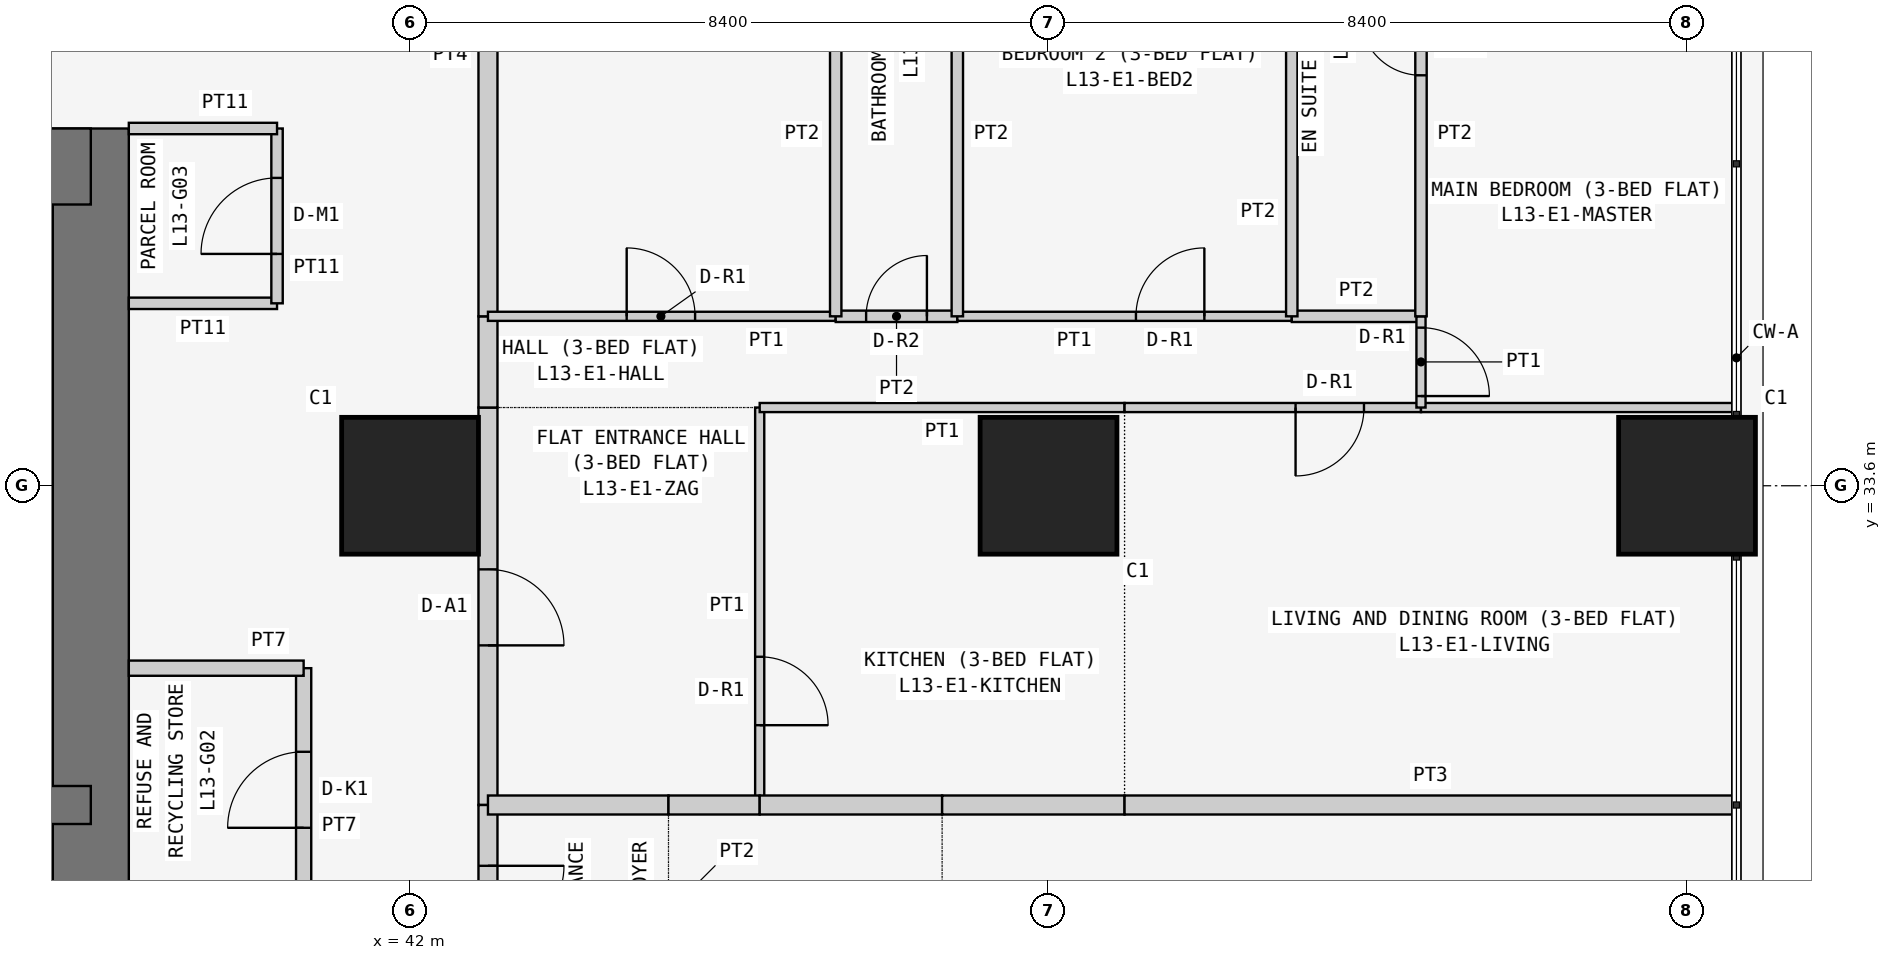
"""IFC4 building model, lengths in metres.
Left out: names, types, materials, properties, quantities, classifications, styles, units other than length and angle.
Written with IfcOpenShell. Run it as: python <this file> out.ifc"""

import sys

from ifc_helpers import new_model, si_unit, direction, frame, frame_2d, origin, origin_2d, place, context, subcontext, project, spatial, rectangle, extrude, element, fill, save


model = new_model("IFC4")
c1 = context("Model", 3, precision=1e-05, world=origin(), true_north=direction((0.0, 1.0)))
c2 = subcontext(c1, "Body", "Model", "MODEL_VIEW")
j1 = project(units=[si_unit("LENGTHUNIT", "METRE"), si_unit("PLANEANGLEUNIT", "RADIAN")], contexts=[c1])
p1 = place(None, origin())
s1 = spatial("IfcSite", under=j1, at=p1, CompositionType="ELEMENT")
p2 = place(p1, origin())
s2 = spatial("IfcBuilding", under=s1, at=p2, CompositionType="ELEMENT")
p3 = place(p2, frame((0.0, 0.0, 56.1)))
s3 = spatial("IfcBuildingStorey", under=s2, at=p3, CompositionType="ELEMENT", Elevation=56.1)
for number, where, z_axis, x_axis in (
    (1, (42.0, 33.6, 0.0), (0.0, 0.0, 1.0), (1.0, 0.0, 0.0)),
    (2, (50.4, 33.6, 0.0), (0.0, 0.0, 1.0), (1.0, 0.0, 0.0)),
    (3, (58.8, 33.6, 0.0), (0.0, 0.0, 1.0), (1.0, 0.0, 0.0)),
):
    element("IfcColumn", number, at=place(p3, frame(where, z_axis=z_axis, x_axis=x_axis)), inside=s3, PredefinedType="COLUMN", context=c2, shape_type="SweptSolid", body=[
        extrude(rectangle(XDim=1.8, YDim=1.8, at=origin_2d()), origin(), (0.0, 0.0, 1.0), 3.6),
    ])
p4 = place(p3, frame((37.8, 21.0, 0.0), z_axis=(0.0, 0.0, 1.0), x_axis=(0.0, 1.0, 0.0)))
e4 = element("IfcWall", 4, at=p4, inside=s3, PredefinedType="SHEAR", context=c2, shape_type="SweptSolid", body=[
    extrude(rectangle(XDim=17.3, YDim=1.0, at=frame_2d((8.65, 0.0))), origin(), (0.0, 0.0, 1.0), 3.6),
])
p5 = place(p4, frame((5.2, 0.0, 0.0)))
e5 = element("IfcOpeningElement", 5, at=p5, cuts=e4, PredefinedType="OPENING", context=c2, shape_type="SweptSolid", body=[
    extrude(rectangle(XDim=1.2, YDim=2.1, at=frame_2d((0.6, 1.05))), frame((0.0, 0.51, 0.0), z_axis=(0.0, -1.0, 0.0), x_axis=(1.0, 0.0, 0.0)), (0.0, 0.0, 1.0), 1.02),
])
p6 = place(p3, frame((37.8, 37.8, 0.0), z_axis=(0.0, 0.0, 1.0), x_axis=(-1.0, 0.0, 0.0)))
e6 = element("IfcWall", 6, at=p6, inside=s3, PredefinedType="SHEAR", context=c2, shape_type="SweptSolid", body=[
    extrude(rectangle(XDim=17.3, YDim=1.0, at=frame_2d((8.65, 0.0))), origin(), (0.0, 0.0, 1.0), 3.6),
])
p7 = place(p3, frame((32.2, 29.4, 0.0), z_axis=(0.0, 0.0, 1.0), x_axis=(1.0, 0.0, 0.0)))
e7 = element("IfcWall", 7, at=p7, inside=s3, PredefinedType="SHEAR", context=c2, shape_type="SweptSolid", body=[
    extrude(rectangle(XDim=5.6, YDim=0.5, at=frame_2d((2.8, 0.0))), origin(), (0.0, 0.0, 1.0), 3.6),
])
p8 = place(p7, frame((2.0, 0.0, 0.0)))
e8 = element("IfcOpeningElement", 8, at=p8, cuts=e7, PredefinedType="OPENING", context=c2, shape_type="SweptSolid", body=[
    extrude(rectangle(XDim=1.2, YDim=2.1, at=frame_2d((0.6, 1.05))), frame((0.0, 0.26, 0.0), z_axis=(0.0, -1.0, 0.0), x_axis=(1.0, 0.0, 0.0)), (0.0, 0.0, 1.0), 0.52),
])
p9 = place(p3, frame((40.6, 28.0, 0.0), z_axis=(0.0, 0.0, 1.0), x_axis=(0.0, 1.0, 0.0)))
e9 = element("IfcWall", 9, at=p9, inside=s3, PredefinedType="PARTITIONING", context=c2, shape_type="SweptSolid", body=[
    extrude(rectangle(XDim=3.2, YDim=0.2, at=frame_2d((1.6, 0.0))), origin(), (0.0, 0.0, 1.0), 3.45),
])
p10 = place(p9, frame((1.1, 0.0, 0.0)))
e10 = element("IfcOpeningElement", 10, at=p10, cuts=e9, PredefinedType="OPENING", context=c2, shape_type="SweptSolid", body=[
    extrude(rectangle(XDim=1.0, YDim=2.1, at=frame_2d((0.5, 1.05))), frame((0.0, 0.11, 0.0), z_axis=(0.0, -1.0, 0.0), x_axis=(1.0, 0.0, 0.0)), (0.0, 0.0, 1.0), 0.22),
])
p11 = place(p3, frame((40.6, 31.2, 0.0), z_axis=(0.0, 0.0, 1.0), x_axis=(-1.0, 0.0, 0.0)))
e11 = element("IfcWall", 11, at=p11, inside=s3, PredefinedType="PARTITIONING", context=c2, shape_type="SweptSolid", body=[
    extrude(rectangle(XDim=2.3, YDim=0.2, at=frame_2d((1.15, 0.0))), origin(), (0.0, 0.0, 1.0), 3.45),
])
p12 = place(p3, frame((38.3, 36.0, 0.0), z_axis=(0.0, 0.0, 1.0), x_axis=(1.0, 0.0, 0.0)))
e12 = element("IfcWall", 12, at=p12, inside=s3, PredefinedType="PARTITIONING", context=c2, shape_type="SweptSolid", body=[
    extrude(rectangle(XDim=1.95, YDim=0.15, at=frame_2d((0.975, 0.0))), origin(), (0.0, 0.0, 1.0), 3.45),
])
p13 = place(p3, frame((40.25, 36.0, 0.0), z_axis=(0.0, 0.0, 1.0), x_axis=(0.0, 1.0, 0.0)))
e13 = element("IfcWall", 13, at=p13, inside=s3, PredefinedType="PARTITIONING", context=c2, shape_type="SweptSolid", body=[
    extrude(rectangle(XDim=2.3, YDim=0.15, at=frame_2d((1.15, 0.0))), origin(), (0.0, 0.0, 1.0), 3.45),
])
p14 = place(p13, frame((0.65, 0.0, 0.0)))
e14 = element("IfcOpeningElement", 14, at=p14, cuts=e13, PredefinedType="OPENING", context=c2, shape_type="SweptSolid", body=[
    extrude(rectangle(XDim=1.0, YDim=2.1, at=frame_2d((0.5, 1.05))), frame((0.0, 0.085, 0.0), z_axis=(0.0, -1.0, 0.0), x_axis=(1.0, 0.0, 0.0)), (0.0, 0.0, 1.0), 0.17),
])
p15 = place(p3, frame((40.25, 38.3, 0.0), z_axis=(0.0, 0.0, 1.0), x_axis=(-1.0, 0.0, 0.0)))
e15 = element("IfcWall", 15, at=p15, inside=s3, PredefinedType="PARTITIONING", context=c2, shape_type="SweptSolid", body=[
    extrude(rectangle(XDim=1.95, YDim=0.15, at=frame_2d((0.975, 0.0))), origin(), (0.0, 0.0, 1.0), 3.45),
])
p16 = place(p3, frame((43.025, 34.629, 0.0), z_axis=(0.0, 0.0, 1.0), x_axis=(0.0, -1.0, 0.0)))
e16 = element("IfcWall", 16, at=p16, inside=s3, PredefinedType="PARTITIONING", context=c2, shape_type="SweptSolid", body=[
    extrude(rectangle(XDim=5.229, YDim=0.25, at=frame_2d((2.615, 0.0))), origin(), (0.0, 0.0, 1.0), 3.45),
])
p17 = place(p16, frame((2.129, 0.0, 0.0)))
e17 = element("IfcOpeningElement", 17, at=p17, cuts=e16, PredefinedType="OPENING", context=c2, shape_type="SweptSolid", body=[
    extrude(rectangle(XDim=1.0, YDim=2.1, at=frame_2d((0.5, 1.05))), frame((0.0, 0.135, 0.0), z_axis=(0.0, -1.0, 0.0), x_axis=(1.0, 0.0, 0.0)), (0.0, 0.0, 1.0), 0.27),
])
p18 = place(p3, frame((43.025, 35.829, 0.0), z_axis=(0.0, 0.0, 1.0), x_axis=(0.0, -1.0, 0.0)))
e18 = element("IfcWall", 18, at=p18, inside=s3, PredefinedType="PARTITIONING", context=c2, shape_type="SweptSolid", body=[
    extrude(rectangle(XDim=1.2, YDim=0.25, at=frame_2d((0.6, 0.0))), origin(), (0.0, 0.0, 1.0), 3.45),
])
p19 = place(p3, frame((43.025, 42.7, 0.0), z_axis=(0.0, 0.0, 1.0), x_axis=(0.0, -1.0, 0.0)))
e19 = element("IfcWall", 19, at=p19, inside=s3, PredefinedType="PARTITIONING", context=c2, shape_type="SweptSolid", body=[
    extrude(rectangle(XDim=6.871, YDim=0.25, at=frame_2d((3.436, 0.0))), origin(), (0.0, 0.0, 1.0), 3.45),
])
p20 = place(p3, frame((43.025, 29.4, 0.0), z_axis=(0.0, 0.0, 1.0), x_axis=(0.0, -1.0, 0.0)))
e20 = element("IfcWall", 20, at=p20, inside=s3, PredefinedType="PARTITIONING", context=c2, shape_type="SweptSolid", body=[
    extrude(rectangle(XDim=2.6, YDim=0.25, at=frame_2d((1.3, 0.0))), origin(), (0.0, 0.0, 1.0), 3.45),
])
p21 = place(p20, frame((0.8, 0.0, 0.0)))
e21 = element("IfcOpeningElement", 21, at=p21, cuts=e20, PredefinedType="OPENING", context=c2, shape_type="SweptSolid", body=[
    extrude(rectangle(XDim=1.0, YDim=2.1, at=frame_2d((0.5, 1.05))), frame((0.0, 0.135, 0.0), z_axis=(0.0, -1.0, 0.0), x_axis=(1.0, 0.0, 0.0)), (0.0, 0.0, 1.0), 0.27),
])
p22 = place(p3, frame((46.6, 29.4, 0.0), z_axis=(0.0, 0.0, 1.0), x_axis=(0.0, 1.0, 0.0)))
e22 = element("IfcWall", 22, at=p22, inside=s3, PredefinedType="PARTITIONING", context=c2, shape_type="SweptSolid", body=[
    extrude(rectangle(XDim=5.229, YDim=0.12, at=frame_2d((2.615, 0.0))), origin(), (0.0, 0.0, 1.0), 3.45),
])
p23 = place(p22, frame((1.05, 0.0, 0.0)))
e23 = element("IfcOpeningElement", 23, at=p23, cuts=e22, PredefinedType="OPENING", context=c2, shape_type="SweptSolid", body=[
    extrude(rectangle(XDim=0.9, YDim=2.1, at=frame_2d((0.45, 1.05))), frame((0.0, 0.07, 0.0), z_axis=(0.0, -1.0, 0.0), x_axis=(1.0, 0.0, 0.0)), (0.0, 0.0, 1.0), 0.14),
])
p24 = place(p3, frame((43.025, 29.4, 0.0), z_axis=(0.0, 0.0, 1.0), x_axis=(1.0, 0.0, 0.0)))
e24 = element("IfcWall", 24, at=p24, inside=s3, PredefinedType="PARTITIONING", context=c2, shape_type="SweptSolid", body=[
    extrude(rectangle(XDim=2.375, YDim=0.25, at=frame_2d((1.188, 0.0))), origin(), (0.0, 0.0, 1.0), 3.45),
])
p25 = place(p3, frame((45.4, 29.4, 0.0), z_axis=(0.0, 0.0, 1.0), x_axis=(1.0, 0.0, 0.0)))
e25 = element("IfcWall", 25, at=p25, inside=s3, PredefinedType="PARTITIONING", context=c2, shape_type="SweptSolid", body=[
    extrude(rectangle(XDim=1.2, YDim=0.25, at=frame_2d((0.6, 0.0))), origin(), (0.0, 0.0, 1.0), 3.45),
])
p26 = place(p3, frame((51.4, 34.629, 0.0), z_axis=(0.0, 0.0, 1.0), x_axis=(-1.0, 0.0, 0.0)))
e26 = element("IfcWall", 26, at=p26, inside=s3, PredefinedType="PARTITIONING", context=c2, shape_type="SweptSolid", body=[
    extrude(rectangle(XDim=4.8, YDim=0.12, at=frame_2d((2.4, 0.0))), origin(), (0.0, 0.0, 1.0), 3.45),
])
for number, where, z_axis, x_axis in (
    (27, (46.6, 29.4, 0.0), (0.0, 0.0, 1.0), (1.0, 0.0, 0.0)),
    (28, (49.0, 29.4, 0.0), (0.0, 0.0, 1.0), (1.0, 0.0, 0.0)),
):
    element("IfcWall", number, at=place(p3, frame(where, z_axis=z_axis, x_axis=x_axis)), inside=s3, PredefinedType="PARTITIONING", context=c2, shape_type="SweptSolid", body=[
        extrude(rectangle(XDim=2.4, YDim=0.25, at=frame_2d((1.2, 0.0))), origin(), (0.0, 0.0, 1.0), 3.45),
    ])
p27 = place(p3, frame((55.3, 34.629, 0.0), z_axis=(0.0, 0.0, 1.0), x_axis=(-1.0, 0.0, 0.0)))
e29 = element("IfcWall", 29, at=p27, inside=s3, PredefinedType="PARTITIONING", context=c2, shape_type="SweptSolid", body=[
    extrude(rectangle(XDim=3.9, YDim=0.12, at=frame_2d((1.95, 0.0))), origin(), (0.0, 0.0, 1.0), 3.45),
])
p28 = place(p27, frame((0.75, 0.0, 0.0)))
e30 = element("IfcOpeningElement", 30, at=p28, cuts=e29, PredefinedType="OPENING", context=c2, shape_type="SweptSolid", body=[
    extrude(rectangle(XDim=0.9, YDim=2.1, at=frame_2d((0.45, 1.05))), frame((0.0, 0.07, 0.0), z_axis=(0.0, -1.0, 0.0), x_axis=(1.0, 0.0, 0.0)), (0.0, 0.0, 1.0), 0.14),
])
p29 = place(p3, frame((59.45, 34.629, 0.0), z_axis=(0.0, 0.0, 1.0), x_axis=(-1.0, 0.0, 0.0)))
e31 = element("IfcWall", 31, at=p29, inside=s3, PredefinedType="PARTITIONING", context=c2, shape_type="SweptSolid", body=[
    extrude(rectangle(XDim=4.15, YDim=0.12, at=frame_2d((2.075, 0.0))), origin(), (0.0, 0.0, 1.0), 3.45),
])
p30 = place(p3, frame((51.4, 29.4, 0.0), z_axis=(0.0, 0.0, 1.0), x_axis=(1.0, 0.0, 0.0)))
e32 = element("IfcWall", 32, at=p30, inside=s3, PredefinedType="PARTITIONING", context=c2, shape_type="SweptSolid", body=[
    extrude(rectangle(XDim=8.05, YDim=0.25, at=frame_2d((4.025, 0.0))), origin(), (0.0, 0.0, 1.0), 3.45),
])
p31 = place(p3, frame((47.6, 35.829, 0.0), z_axis=(0.0, 0.0, 1.0), x_axis=(-1.0, 0.0, 0.0)))
e33 = element("IfcWall", 33, at=p31, inside=s3, PredefinedType="PARTITIONING", context=c2, shape_type="SweptSolid", body=[
    extrude(rectangle(XDim=4.575, YDim=0.12, at=frame_2d((2.288, 0.0))), origin(), (0.0, 0.0, 1.0), 3.45),
])
p32 = place(p31, frame((1.85, 0.0, 0.0)))
e34 = element("IfcOpeningElement", 34, at=p32, cuts=e33, PredefinedType="OPENING", context=c2, shape_type="SweptSolid", body=[
    extrude(rectangle(XDim=0.9, YDim=2.1, at=frame_2d((0.45, 1.05))), frame((0.0, 0.07, 0.0), z_axis=(0.0, -1.0, 0.0), x_axis=(1.0, 0.0, 0.0)), (0.0, 0.0, 1.0), 0.14),
])
p33 = place(p3, frame((49.2, 35.829, 0.0), z_axis=(0.0, 0.0, 1.0), x_axis=(-1.0, 0.0, 0.0)))
e35 = element("IfcWall", 35, at=p33, inside=s3, PredefinedType="PARTITIONING", context=c2, shape_type="SweptSolid", body=[
    extrude(rectangle(XDim=1.6, YDim=0.15, at=frame_2d((0.8, 0.0))), origin(), (0.0, 0.0, 1.0), 3.45),
])
p34 = place(p33, frame((0.4, 0.0, 0.0)))
e36 = element("IfcOpeningElement", 36, at=p34, cuts=e35, PredefinedType="OPENING", context=c2, shape_type="SweptSolid", body=[
    extrude(rectangle(XDim=0.8, YDim=2.1, at=frame_2d((0.4, 1.05))), frame((0.0, 0.085, 0.0), z_axis=(0.0, -1.0, 0.0), x_axis=(1.0, 0.0, 0.0)), (0.0, 0.0, 1.0), 0.17),
])
p35 = place(p3, frame((53.6, 35.829, 0.0), z_axis=(0.0, 0.0, 1.0), x_axis=(-1.0, 0.0, 0.0)))
e37 = element("IfcWall", 37, at=p35, inside=s3, PredefinedType="PARTITIONING", context=c2, shape_type="SweptSolid", body=[
    extrude(rectangle(XDim=4.4, YDim=0.12, at=frame_2d((2.2, 0.0))), origin(), (0.0, 0.0, 1.0), 3.45),
])
p36 = place(p35, frame((1.15, 0.0, 0.0)))
e38 = element("IfcOpeningElement", 38, at=p36, cuts=e37, PredefinedType="OPENING", context=c2, shape_type="SweptSolid", body=[
    extrude(rectangle(XDim=0.9, YDim=2.1, at=frame_2d((0.45, 1.05))), frame((0.0, 0.07, 0.0), z_axis=(0.0, -1.0, 0.0), x_axis=(1.0, 0.0, 0.0)), (0.0, 0.0, 1.0), 0.14),
])
p37 = place(p3, frame((55.3, 35.829, 0.0), z_axis=(0.0, 0.0, 1.0), x_axis=(-1.0, 0.0, 0.0)))
e39 = element("IfcWall", 39, at=p37, inside=s3, PredefinedType="PARTITIONING", context=c2, shape_type="SweptSolid", body=[
    extrude(rectangle(XDim=1.7, YDim=0.15, at=frame_2d((0.85, 0.0))), origin(), (0.0, 0.0, 1.0), 3.45),
])
p38 = place(p3, frame((55.3, 34.629, 0.0), z_axis=(0.0, 0.0, 1.0), x_axis=(0.0, 1.0, 0.0)))
e40 = element("IfcWall", 40, at=p38, inside=s3, PredefinedType="PARTITIONING", context=c2, shape_type="SweptSolid", body=[
    extrude(rectangle(XDim=1.2, YDim=0.12, at=frame_2d((0.6, 0.0))), origin(), (0.0, 0.0, 1.0), 3.45),
])
p39 = place(p38, frame((0.151, 0.0, 0.0)))
e41 = element("IfcOpeningElement", 41, at=p39, cuts=e40, PredefinedType="OPENING", context=c2, shape_type="SweptSolid", body=[
    extrude(rectangle(XDim=0.9, YDim=2.1, at=frame_2d((0.45, 1.05))), frame((0.0, 0.07, 0.0), z_axis=(0.0, -1.0, 0.0), x_axis=(1.0, 0.0, 0.0)), (0.0, 0.0, 1.0), 0.14),
])
for number, where, z_axis, x_axis in (
    (42, (47.6, 35.829, 0.0), (0.0, 0.0, 1.0), (0.0, 1.0, 0.0)),
    (43, (49.2, 35.829, 0.0), (0.0, 0.0, 1.0), (0.0, 1.0, 0.0)),
    (44, (53.6, 35.829, 0.0), (0.0, 0.0, 1.0), (0.0, 1.0, 0.0)),
):
    element("IfcWall", number, at=place(p3, frame(where, z_axis=z_axis, x_axis=x_axis)), inside=s3, PredefinedType="PARTITIONING", context=c2, shape_type="SweptSolid", body=[
        extrude(rectangle(XDim=6.871, YDim=0.15, at=frame_2d((3.436, 0.0))), origin(), (0.0, 0.0, 1.0), 3.45),
    ])
p40 = place(p3, frame((55.3, 35.829, 0.0), z_axis=(0.0, 0.0, 1.0), x_axis=(0.0, 1.0, 0.0)))
e45 = element("IfcWall", 45, at=p40, inside=s3, PredefinedType="PARTITIONING", context=c2, shape_type="SweptSolid", body=[
    extrude(rectangle(XDim=6.871, YDim=0.15, at=frame_2d((3.436, 0.0))), origin(), (0.0, 0.0, 1.0), 3.45),
])
p41 = place(p40, frame((3.171, 0.0, 0.0)))
e46 = element("IfcOpeningElement", 46, at=p41, cuts=e45, PredefinedType="OPENING", context=c2, shape_type="SweptSolid", body=[
    extrude(rectangle(XDim=0.8, YDim=2.1, at=frame_2d((0.4, 1.05))), frame((0.0, 0.085, 0.0), z_axis=(0.0, -1.0, 0.0), x_axis=(1.0, 0.0, 0.0)), (0.0, 0.0, 1.0), 0.17),
])
p42 = place(p10, origin())
e47 = element("IfcDoor", 47, at=p42, inside=s3, OperationType="SINGLE_SWING_LEFT", PredefinedType="DOOR", context=c2, shape_type="SweptSolid", body=[
    extrude(rectangle(XDim=1.0, YDim=2.1, at=frame_2d((0.5, 1.05))), frame((0.0, 0.025, 0.0), z_axis=(0.0, -1.0, 0.0), x_axis=(1.0, 0.0, 0.0)), (0.0, 0.0, 1.0), 0.05),
])
fill(e10, e47)
p43 = place(p14, origin())
e48 = element("IfcDoor", 48, at=p43, inside=s3, OperationType="SINGLE_SWING_LEFT", PredefinedType="DOOR", context=c2, shape_type="SweptSolid", body=[
    extrude(rectangle(XDim=1.0, YDim=2.1, at=frame_2d((0.5, 1.05))), frame((0.0, 0.025, 0.0), z_axis=(0.0, -1.0, 0.0), x_axis=(1.0, 0.0, 0.0)), (0.0, 0.0, 1.0), 0.05),
])
fill(e14, e48)
p44 = place(p17, origin())
e49 = element("IfcDoor", 49, at=p44, inside=s3, OperationType="SINGLE_SWING_RIGHT", PredefinedType="DOOR", context=c2, shape_type="SweptSolid", body=[
    extrude(rectangle(XDim=1.0, YDim=2.1, at=frame_2d((0.5, 1.05))), frame((0.0, 0.025, 0.0), z_axis=(0.0, -1.0, 0.0), x_axis=(1.0, 0.0, 0.0)), (0.0, 0.0, 1.0), 0.05),
])
fill(e17, e49)
p45 = place(p23, frame((0.9, 0.0, 0.0), z_axis=(0.0, 0.0, 1.0), x_axis=(-1.0, 0.0, 0.0)))
e50 = element("IfcDoor", 50, at=p45, inside=s3, OperationType="SINGLE_SWING_RIGHT", PredefinedType="DOOR", context=c2, shape_type="SweptSolid", body=[
    extrude(rectangle(XDim=0.9, YDim=2.1, at=frame_2d((0.45, 1.05))), frame((0.0, 0.025, 0.0), z_axis=(0.0, -1.0, 0.0), x_axis=(1.0, 0.0, 0.0)), (0.0, 0.0, 1.0), 0.05),
])
fill(e23, e50)
p46 = place(p28, origin())
e51 = element("IfcDoor", 51, at=p46, inside=s3, OperationType="SINGLE_SWING_RIGHT", PredefinedType="DOOR", context=c2, shape_type="SweptSolid", body=[
    extrude(rectangle(XDim=0.9, YDim=2.1, at=frame_2d((0.45, 1.05))), frame((0.0, 0.025, 0.0), z_axis=(0.0, -1.0, 0.0), x_axis=(1.0, 0.0, 0.0)), (0.0, 0.0, 1.0), 0.05),
])
fill(e30, e51)
p47 = place(p32, frame((0.9, 0.0, 0.0), z_axis=(0.0, 0.0, 1.0), x_axis=(-1.0, 0.0, 0.0)))
e52 = element("IfcDoor", 52, at=p47, inside=s3, OperationType="SINGLE_SWING_LEFT", PredefinedType="DOOR", context=c2, shape_type="SweptSolid", body=[
    extrude(rectangle(XDim=0.9, YDim=2.1, at=frame_2d((0.45, 1.05))), frame((0.0, 0.025, 0.0), z_axis=(0.0, -1.0, 0.0), x_axis=(1.0, 0.0, 0.0)), (0.0, 0.0, 1.0), 0.05),
])
fill(e34, e52)
p48 = place(p34, frame((0.8, 0.0, 0.0), z_axis=(0.0, 0.0, 1.0), x_axis=(-1.0, 0.0, 0.0)))
e53 = element("IfcDoor", 53, at=p48, inside=s3, OperationType="SINGLE_SWING_RIGHT", PredefinedType="DOOR", context=c2, shape_type="SweptSolid", body=[
    extrude(rectangle(XDim=0.8, YDim=2.1, at=frame_2d((0.4, 1.05))), frame((0.0, 0.025, 0.0), z_axis=(0.0, -1.0, 0.0), x_axis=(1.0, 0.0, 0.0)), (0.0, 0.0, 1.0), 0.05),
])
fill(e36, e53)
p49 = place(p36, frame((0.9, 0.0, 0.0), z_axis=(0.0, 0.0, 1.0), x_axis=(-1.0, 0.0, 0.0)))
e54 = element("IfcDoor", 54, at=p49, inside=s3, OperationType="SINGLE_SWING_RIGHT", PredefinedType="DOOR", context=c2, shape_type="SweptSolid", body=[
    extrude(rectangle(XDim=0.9, YDim=2.1, at=frame_2d((0.45, 1.05))), frame((0.0, 0.025, 0.0), z_axis=(0.0, -1.0, 0.0), x_axis=(1.0, 0.0, 0.0)), (0.0, 0.0, 1.0), 0.05),
])
fill(e38, e54)
p50 = place(p39, frame((0.9, 0.0, 0.0), z_axis=(0.0, 0.0, 1.0), x_axis=(-1.0, 0.0, 0.0)))
e55 = element("IfcDoor", 55, at=p50, inside=s3, OperationType="SINGLE_SWING_RIGHT", PredefinedType="DOOR", context=c2, shape_type="SweptSolid", body=[
    extrude(rectangle(XDim=0.9, YDim=2.1, at=frame_2d((0.45, 1.05))), frame((0.0, 0.025, 0.0), z_axis=(0.0, -1.0, 0.0), x_axis=(1.0, 0.0, 0.0)), (0.0, 0.0, 1.0), 0.05),
])
fill(e41, e55)
p51 = place(p41, origin())
e56 = element("IfcDoor", 56, at=p51, inside=s3, OperationType="SINGLE_SWING_RIGHT", PredefinedType="DOOR", context=c2, shape_type="SweptSolid", body=[
    extrude(rectangle(XDim=0.8, YDim=2.1, at=frame_2d((0.4, 1.05))), frame((0.0, 0.025, 0.0), z_axis=(0.0, -1.0, 0.0), x_axis=(1.0, 0.0, 0.0)), (0.0, 0.0, 1.0), 0.05),
])
fill(e46, e56)
p52 = place(p21, origin())
e57 = element("IfcDoor", 57, at=p52, inside=s3, OperationType="SINGLE_SWING_LEFT", PredefinedType="DOOR", context=c2, shape_type="SweptSolid", body=[
    extrude(rectangle(XDim=1.0, YDim=2.1, at=frame_2d((0.5, 1.05))), frame((0.0, 0.025, 0.0), z_axis=(0.0, -1.0, 0.0), x_axis=(1.0, 0.0, 0.0)), (0.0, 0.0, 1.0), 0.05),
])
fill(e21, e57)
save(model, sys.argv[1])
